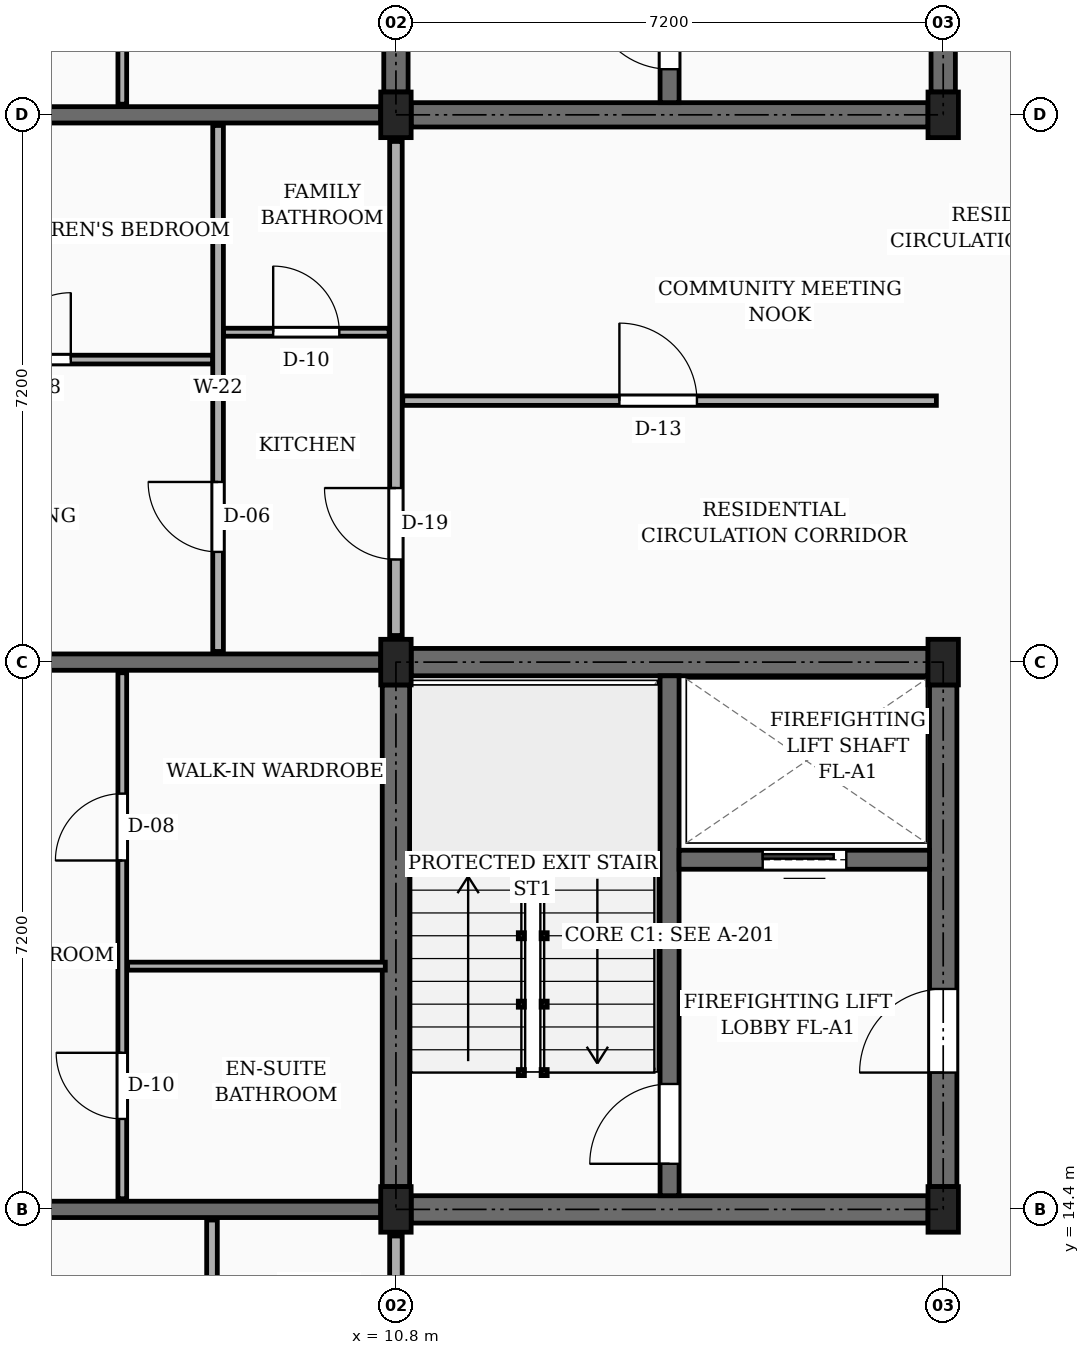
"""IFC4 building model, lengths in metres.
Left out: names, types, materials, properties, quantities, classifications, styles, units other than length and angle.
Written with IfcOpenShell. Run it as: python <this file> out.ifc"""

import sys

from ifc_helpers import new_model, si_unit, direction, frame, frame_2d, origin, origin_2d, place, context, subcontext, project, spatial, rectangle, extrude, element, fill, save


model = new_model("IFC4")
c1 = context("Model", 3, precision=1e-05, world=origin(), true_north=direction((0.0, 1.0)))
c2 = subcontext(c1, "Body", "Model", "MODEL_VIEW")
j1 = project(units=[si_unit("LENGTHUNIT", "METRE"), si_unit("PLANEANGLEUNIT", "RADIAN")], contexts=[c1])
p1 = place(None, origin())
s1 = spatial("IfcSite", under=j1, at=p1, CompositionType="ELEMENT")
p2 = place(p1, origin())
s2 = spatial("IfcBuilding", under=s1, at=p2, CompositionType="ELEMENT")
p3 = place(p2, frame((0.0, 0.0, 26.55)))
s3 = spatial("IfcBuildingStorey", under=s2, at=p3, CompositionType="ELEMENT", Elevation=26.55)
for number, where, z_axis, x_axis in (
    (1, (10.8, 14.4, 0.0), (0.0, 0.0, 1.0), (1.0, 0.0, 0.0)),
    (2, (10.8, 21.6, 0.0), (0.0, 0.0, 1.0), (1.0, 0.0, 0.0)),
    (3, (10.8, 28.8, 0.0), (0.0, 0.0, 1.0), (1.0, 0.0, 0.0)),
    (4, (18.0, 14.4, 0.0), (0.0, 0.0, 1.0), (1.0, 0.0, 0.0)),
    (5, (18.0, 21.6, 0.0), (0.0, 0.0, 1.0), (1.0, 0.0, 0.0)),
    (6, (18.0, 28.8, 0.0), (0.0, 0.0, 1.0), (1.0, 0.0, 0.0)),
):
    element("IfcColumn", number, at=place(p3, frame(where, z_axis=z_axis, x_axis=x_axis)), inside=s3, PredefinedType="COLUMN", context=c2, shape_type="SweptSolid", body=[
        extrude(rectangle(XDim=0.4, YDim=0.6, at=origin_2d()), origin(), (0.0, 0.0, 1.0), 3.15),
    ])
p4 = place(p3, frame((3.85, 14.4, 0.0), z_axis=(0.0, 0.0, 1.0), x_axis=(1.0, 0.0, 0.0)))
e7 = element("IfcWall", 7, at=p4, inside=s3, PredefinedType="SOLIDWALL", context=c2, shape_type="SweptSolid", body=[
    extrude(rectangle(XDim=6.75, YDim=0.215, at=frame_2d((3.375, 0.0))), origin(), (0.0, 0.0, 1.0), 2.17),
])
p5 = place(p4, frame((1.35, 0.0, 0.0)))
e8 = element("IfcOpeningElement", 8, at=p5, cuts=e7, PredefinedType="OPENING", context=c2, shape_type="SweptSolid", body=[
    extrude(rectangle(XDim=0.98, YDim=2.12, at=frame_2d((0.49, 1.06))), frame((0.0, 0.118, 0.0), z_axis=(0.0, -1.0, 0.0), x_axis=(1.0, 0.0, 0.0)), (0.0, 0.0, 1.0), 0.235),
])
p6 = place(p3, frame((3.85, 21.6, 0.0), z_axis=(0.0, 0.0, 1.0), x_axis=(1.0, 0.0, 0.0)))
e9 = element("IfcWall", 9, at=p6, inside=s3, PredefinedType="SOLIDWALL", context=c2, shape_type="SweptSolid", body=[
    extrude(rectangle(XDim=6.75, YDim=0.215, at=frame_2d((3.375, 0.0))), origin(), (0.0, 0.0, 1.0), 2.17),
])
p7 = place(p3, frame((3.85, 28.8, 0.0), z_axis=(0.0, 0.0, 1.0), x_axis=(1.0, 0.0, 0.0)))
e10 = element("IfcWall", 10, at=p7, inside=s3, PredefinedType="SOLIDWALL", context=c2, shape_type="SweptSolid", body=[
    extrude(rectangle(XDim=6.75, YDim=0.215, at=frame_2d((3.375, 0.0))), origin(), (0.0, 0.0, 1.0), 2.17),
])
p8 = place(p7, frame((1.35, 0.0, 0.0)))
e11 = element("IfcOpeningElement", 11, at=p8, cuts=e10, PredefinedType="OPENING", context=c2, shape_type="SweptSolid", body=[
    extrude(rectangle(XDim=0.98, YDim=2.12, at=frame_2d((0.49, 1.06))), frame((0.0, 0.118, 0.0), z_axis=(0.0, -1.0, 0.0), x_axis=(1.0, 0.0, 0.0)), (0.0, 0.0, 1.0), 0.235),
])
p9 = place(p3, frame((10.8, 14.7, 0.0), z_axis=(0.0, 0.0, 1.0), x_axis=(0.0, 1.0, 0.0)))
e12 = element("IfcWall", 12, at=p9, inside=s3, PredefinedType="SHEAR", context=c2, shape_type="SweptSolid", body=[
    extrude(rectangle(XDim=6.6, YDim=0.36, at=frame_2d((3.3, 0.0))), origin(), (0.0, 0.0, 1.0), 2.87),
])
p10 = place(p3, frame((11.0, 21.6, 0.0), z_axis=(0.0, 0.0, 1.0), x_axis=(1.0, 0.0, 0.0)))
e13 = element("IfcWall", 13, at=p10, inside=s3, PredefinedType="SHEAR", context=c2, shape_type="SweptSolid", body=[
    extrude(rectangle(XDim=6.8, YDim=0.36, at=frame_2d((3.4, 0.0))), origin(), (0.0, 0.0, 1.0), 2.87),
])
p11 = place(p3, frame((18.0, 14.7, 0.0), z_axis=(0.0, 0.0, 1.0), x_axis=(0.0, 1.0, 0.0)))
e14 = element("IfcWall", 14, at=p11, inside=s3, PredefinedType="SHEAR", context=c2, shape_type="SweptSolid", body=[
    extrude(rectangle(XDim=6.6, YDim=0.36, at=frame_2d((3.3, 0.0))), origin(), (0.0, 0.0, 1.0), 2.87),
])
p12 = place(p11, frame((1.5, 0.0, 0.0)))
e15 = element("IfcOpeningElement", 15, at=p12, cuts=e14, PredefinedType="OPENING", context=c2, shape_type="SweptSolid", body=[
    extrude(rectangle(XDim=1.1, YDim=2.15, at=frame_2d((0.55, 1.075))), frame((0.0, 0.19, 0.0), z_axis=(0.0, -1.0, 0.0), x_axis=(1.0, 0.0, 0.0)), (0.0, 0.0, 1.0), 0.38),
])
p13 = place(p3, frame((11.0, 14.4, 0.0), z_axis=(0.0, 0.0, 1.0), x_axis=(1.0, 0.0, 0.0)))
e16 = element("IfcWall", 16, at=p13, inside=s3, PredefinedType="SHEAR", context=c2, shape_type="SweptSolid", body=[
    extrude(rectangle(XDim=6.8, YDim=0.36, at=frame_2d((3.4, 0.0))), origin(), (0.0, 0.0, 1.0), 2.87),
])
p14 = place(p3, frame((14.4, 14.58, 0.0), z_axis=(0.0, 0.0, 1.0), x_axis=(0.0, 1.0, 0.0)))
e17 = element("IfcWall", 17, at=p14, inside=s3, PredefinedType="SHEAR", context=c2, shape_type="SweptSolid", body=[
    extrude(rectangle(XDim=6.84, YDim=0.25, at=frame_2d((3.42, 0.0))), origin(), (0.0, 0.0, 1.0), 2.87),
])
p15 = place(p14, frame((0.42, 0.0, 0.0)))
e18 = element("IfcOpeningElement", 18, at=p15, cuts=e17, PredefinedType="OPENING", context=c2, shape_type="SweptSolid", body=[
    extrude(rectangle(XDim=1.05, YDim=2.15, at=frame_2d((0.525, 1.075))), frame((0.0, 0.135, 0.0), z_axis=(0.0, -1.0, 0.0), x_axis=(1.0, 0.0, 0.0)), (0.0, 0.0, 1.0), 0.27),
])
p16 = place(p3, frame((14.525, 19.0, 0.0), z_axis=(0.0, 0.0, 1.0), x_axis=(1.0, 0.0, 0.0)))
e19 = element("IfcWall", 19, at=p16, inside=s3, PredefinedType="SHEAR", context=c2, shape_type="SweptSolid", body=[
    extrude(rectangle(XDim=3.295, YDim=0.25, at=frame_2d((1.647, 0.0))), origin(), (0.0, 0.0, 1.0), 2.87),
])
p17 = place(p16, frame((1.1, 0.0, 0.0)))
e20 = element("IfcOpeningElement", 20, at=p17, cuts=e19, PredefinedType="OPENING", context=c2, shape_type="SweptSolid", body=[
    extrude(rectangle(XDim=1.1, YDim=2.2, at=frame_2d((0.55, 1.1))), frame((0.0, 0.135, 0.0), z_axis=(0.0, -1.0, 0.0), x_axis=(1.0, 0.0, 0.0)), (0.0, 0.0, 1.0), 0.27),
])
p18 = place(p3, frame((10.8, 29.1, 0.0), z_axis=(0.0, 0.0, 1.0), x_axis=(0.0, 1.0, 0.0)))
e21 = element("IfcWall", 21, at=p18, inside=s3, PredefinedType="SHEAR", context=c2, shape_type="SweptSolid", body=[
    extrude(rectangle(XDim=6.6, YDim=0.32, at=frame_2d((3.3, 0.0))), origin(), (0.0, 0.0, 1.0), 2.87),
])
p19 = place(p3, frame((18.0, 29.1, 0.0), z_axis=(0.0, 0.0, 1.0), x_axis=(0.0, 1.0, 0.0)))
e22 = element("IfcWall", 22, at=p19, inside=s3, PredefinedType="SHEAR", context=c2, shape_type="SweptSolid", body=[
    extrude(rectangle(XDim=6.6, YDim=0.32, at=frame_2d((3.3, 0.0))), origin(), (0.0, 0.0, 1.0), 2.87),
])
p20 = place(p19, frame((1.5, 0.0, 0.0)))
e23 = element("IfcOpeningElement", 23, at=p20, cuts=e22, PredefinedType="OPENING", context=c2, shape_type="SweptSolid", body=[
    extrude(rectangle(XDim=1.1, YDim=2.15, at=frame_2d((0.55, 1.075))), frame((0.0, 0.17, 0.0), z_axis=(0.0, -1.0, 0.0), x_axis=(1.0, 0.0, 0.0)), (0.0, 0.0, 1.0), 0.34),
])
p21 = place(p3, frame((11.0, 28.8, 0.0), z_axis=(0.0, 0.0, 1.0), x_axis=(1.0, 0.0, 0.0)))
e24 = element("IfcWall", 24, at=p21, inside=s3, PredefinedType="SHEAR", context=c2, shape_type="SweptSolid", body=[
    extrude(rectangle(XDim=6.8, YDim=0.32, at=frame_2d((3.4, 0.0))), origin(), (0.0, 0.0, 1.0), 2.87),
])
p22 = place(p3, frame((14.4, 28.96, 0.0), z_axis=(0.0, 0.0, 1.0), x_axis=(0.0, 1.0, 0.0)))
e25 = element("IfcWall", 25, at=p22, inside=s3, PredefinedType="SHEAR", context=c2, shape_type="SweptSolid", body=[
    extrude(rectangle(XDim=6.88, YDim=0.25, at=frame_2d((3.44, 0.0))), origin(), (0.0, 0.0, 1.0), 2.87),
])
p23 = place(p22, frame((0.44, 0.0, 0.0)))
e26 = element("IfcOpeningElement", 26, at=p23, cuts=e25, PredefinedType="OPENING", context=c2, shape_type="SweptSolid", body=[
    extrude(rectangle(XDim=1.05, YDim=2.15, at=frame_2d((0.525, 1.075))), frame((0.0, 0.135, 0.0), z_axis=(0.0, -1.0, 0.0), x_axis=(1.0, 0.0, 0.0)), (0.0, 0.0, 1.0), 0.27),
])
p24 = place(p3, frame((10.8, 7.55, 0.0), z_axis=(0.0, 0.0, 1.0), x_axis=(0.0, 1.0, 0.0)))
e27 = element("IfcWall", 27, at=p24, inside=s3, PredefinedType="PARTITIONING", context=c2, shape_type="SweptSolid", body=[
    extrude(rectangle(XDim=6.5, YDim=0.165, at=frame_2d((3.25, 0.0))), origin(), (0.0, 0.0, 1.0), 2.305),
])
p25 = place(p24, frame((1.0, 0.0, 0.0)))
e28 = element("IfcOpeningElement", 28, at=p25, cuts=e27, PredefinedType="OPENING", context=c2, shape_type="SweptSolid", body=[
    extrude(rectangle(XDim=1.0, YDim=2.15, at=frame_2d((0.5, 1.075))), frame((0.0, 0.093, 0.0), z_axis=(0.0, -1.0, 0.0), x_axis=(1.0, 0.0, 0.0)), (0.0, 0.0, 1.0), 0.185),
])
p26 = place(p3, frame((10.8, 21.95, 0.0), z_axis=(0.0, 0.0, 1.0), x_axis=(0.0, 1.0, 0.0)))
e29 = element("IfcWall", 29, at=p26, inside=s3, PredefinedType="PARTITIONING", context=c2, shape_type="SweptSolid", body=[
    extrude(rectangle(XDim=6.5, YDim=0.165, at=frame_2d((3.25, 0.0))), origin(), (0.0, 0.0, 1.0), 2.305),
])
p27 = place(p26, frame((1.0, 0.0, 0.0)))
e30 = element("IfcOpeningElement", 30, at=p27, cuts=e29, PredefinedType="OPENING", context=c2, shape_type="SweptSolid", body=[
    extrude(rectangle(XDim=0.94, YDim=2.12, at=frame_2d((0.47, 1.06))), frame((0.0, 0.093, 0.0), z_axis=(0.0, -1.0, 0.0), x_axis=(1.0, 0.0, 0.0)), (0.0, 0.0, 1.0), 0.185),
])
p28 = place(p3, frame((8.38, 7.375, 0.0), z_axis=(0.0, 0.0, 1.0), x_axis=(0.0, 1.0, 0.0)))
e31 = element("IfcWall", 31, at=p28, inside=s3, PredefinedType="PARTITIONING", context=c2, shape_type="SweptSolid", body=[
    extrude(rectangle(XDim=6.885, YDim=0.14, at=frame_2d((3.442, 0.0))), origin(), (0.0, 0.0, 1.0), 2.305),
])
p29 = place(p28, frame((1.275, 0.0, 0.0)))
e32 = element("IfcOpeningElement", 32, at=p29, cuts=e31, PredefinedType="OPENING", context=c2, shape_type="SweptSolid", body=[
    extrude(rectangle(XDim=0.92, YDim=2.1, at=frame_2d((0.46, 1.05))), frame((0.0, 0.08, 0.0), z_axis=(0.0, -1.0, 0.0), x_axis=(1.0, 0.0, 0.0)), (0.0, 0.0, 1.0), 0.16),
])
p30 = place(p3, frame((7.2, 14.54, 0.0), z_axis=(0.0, 0.0, 1.0), x_axis=(0.0, 1.0, 0.0)))
e33 = element("IfcWall", 33, at=p30, inside=s3, PredefinedType="PARTITIONING", context=c2, shape_type="SweptSolid", body=[
    extrude(rectangle(XDim=6.92, YDim=0.115, at=frame_2d((3.46, 0.0))), origin(), (0.0, 0.0, 1.0), 2.305),
])
p31 = place(p30, frame((1.05, 0.0, 0.0)))
e34 = element("IfcOpeningElement", 34, at=p31, cuts=e33, PredefinedType="OPENING", context=c2, shape_type="SweptSolid", body=[
    extrude(rectangle(XDim=0.87, YDim=2.05, at=frame_2d((0.435, 1.025))), frame((0.0, 0.067, 0.0), z_axis=(0.0, -1.0, 0.0), x_axis=(1.0, 0.0, 0.0)), (0.0, 0.0, 1.0), 0.135),
])
p32 = place(p30, frame((4.45, 0.0, 0.0)))
e35 = element("IfcOpeningElement", 35, at=p32, cuts=e33, PredefinedType="OPENING", context=c2, shape_type="SweptSolid", body=[
    extrude(rectangle(XDim=0.88, YDim=2.08, at=frame_2d((0.44, 1.04))), frame((0.0, 0.067, 0.0), z_axis=(0.0, -1.0, 0.0), x_axis=(1.0, 0.0, 0.0)), (0.0, 0.0, 1.0), 0.135),
])
p33 = place(p3, frame((7.27, 17.6, 0.0), z_axis=(0.0, 0.0, 1.0), x_axis=(1.0, 0.0, 0.0)))
e36 = element("IfcWall", 36, at=p33, inside=s3, PredefinedType="PARTITIONING", context=c2, shape_type="SweptSolid", body=[
    extrude(rectangle(XDim=3.39, YDim=0.105, at=frame_2d((1.695, 0.0))), origin(), (0.0, 0.0, 1.0), 2.305),
])
p34 = place(p3, frame((10.89, 25.04, 0.0), z_axis=(0.0, 0.0, 1.0), x_axis=(1.0, 0.0, 0.0)))
e37 = element("IfcWall", 37, at=p34, inside=s3, PredefinedType="PARTITIONING", context=c2, shape_type="SweptSolid", body=[
    extrude(rectangle(XDim=7.02, YDim=0.125, at=frame_2d((3.51, 0.0))), origin(), (0.0, 0.0, 1.0), 2.305),
])
p35 = place(p34, frame((2.85, 0.0, 0.0)))
e38 = element("IfcOpeningElement", 38, at=p35, cuts=e37, PredefinedType="OPENING", context=c2, shape_type="SweptSolid", body=[
    extrude(rectangle(XDim=1.02, YDim=2.15, at=frame_2d((0.51, 1.075))), frame((0.0, 0.073, 0.0), z_axis=(0.0, -1.0, 0.0), x_axis=(1.0, 0.0, 0.0)), (0.0, 0.0, 1.0), 0.145),
])
p36 = place(p3, frame((3.775, 25.58, 0.0), z_axis=(0.0, 0.0, 1.0), x_axis=(1.0, 0.0, 0.0)))
e39 = element("IfcWall", 39, at=p36, inside=s3, PredefinedType="PARTITIONING", context=c2, shape_type="SweptSolid", body=[
    extrude(rectangle(XDim=4.615, YDim=0.115, at=frame_2d((2.308, 0.0))), origin(), (0.0, 0.0, 1.0), 2.305),
])
p37 = place(p36, frame((1.867, 0.0, 0.0)))
e40 = element("IfcOpeningElement", 40, at=p37, cuts=e39, PredefinedType="OPENING", context=c2, shape_type="SweptSolid", body=[
    extrude(rectangle(XDim=0.88, YDim=2.08, at=frame_2d((0.44, 1.04))), frame((0.0, 0.067, 0.0), z_axis=(0.0, -1.0, 0.0), x_axis=(1.0, 0.0, 0.0)), (0.0, 0.0, 1.0), 0.135),
])
p38 = place(p3, frame((8.53, 25.94, 0.0), z_axis=(0.0, 0.0, 1.0), x_axis=(1.0, 0.0, 0.0)))
e41 = element("IfcWall", 41, at=p38, inside=s3, PredefinedType="PARTITIONING", context=c2, shape_type="SweptSolid", body=[
    extrude(rectangle(XDim=2.18, YDim=0.105, at=frame_2d((1.09, 0.0))), origin(), (0.0, 0.0, 1.0), 2.305),
])
p39 = place(p38, frame((0.655, 0.0, 0.0)))
e42 = element("IfcOpeningElement", 42, at=p39, cuts=e41, PredefinedType="OPENING", context=c2, shape_type="SweptSolid", body=[
    extrude(rectangle(XDim=0.87, YDim=2.05, at=frame_2d((0.435, 1.025))), frame((0.0, 0.062, 0.0), z_axis=(0.0, -1.0, 0.0), x_axis=(1.0, 0.0, 0.0)), (0.0, 0.0, 1.0), 0.125),
])
p40 = place(p3, frame((8.46, 21.74, 0.0), z_axis=(0.0, 0.0, 1.0), x_axis=(0.0, 1.0, 0.0)))
e43 = element("IfcWall", 43, at=p40, inside=s3, PredefinedType="PARTITIONING", context=c2, shape_type="SweptSolid", body=[
    extrude(rectangle(XDim=6.92, YDim=0.14, at=frame_2d((3.46, 0.0))), origin(), (0.0, 0.0, 1.0), 2.305),
])
p41 = place(p40, frame((1.31, 0.0, 0.0)))
e44 = element("IfcOpeningElement", 44, at=p41, cuts=e43, PredefinedType="OPENING", context=c2, shape_type="SweptSolid", body=[
    extrude(rectangle(XDim=0.92, YDim=2.1, at=frame_2d((0.46, 1.05))), frame((0.0, 0.08, 0.0), z_axis=(0.0, -1.0, 0.0), x_axis=(1.0, 0.0, 0.0)), (0.0, 0.0, 1.0), 0.16),
])
p42 = place(p3, frame((7.2, 28.94, 0.0), z_axis=(0.0, 0.0, 1.0), x_axis=(0.0, 1.0, 0.0)))
e45 = element("IfcWall", 45, at=p42, inside=s3, PredefinedType="PARTITIONING", context=c2, shape_type="SweptSolid", body=[
    extrude(rectangle(XDim=6.92, YDim=0.115, at=frame_2d((3.46, 0.0))), origin(), (0.0, 0.0, 1.0), 2.305),
])
p43 = place(p42, frame((1.05, 0.0, 0.0)))
e46 = element("IfcOpeningElement", 46, at=p43, cuts=e45, PredefinedType="OPENING", context=c2, shape_type="SweptSolid", body=[
    extrude(rectangle(XDim=0.87, YDim=2.05, at=frame_2d((0.435, 1.025))), frame((0.0, 0.067, 0.0), z_axis=(0.0, -1.0, 0.0), x_axis=(1.0, 0.0, 0.0)), (0.0, 0.0, 1.0), 0.135),
])
p44 = place(p42, frame((4.45, 0.0, 0.0)))
e47 = element("IfcOpeningElement", 47, at=p44, cuts=e45, PredefinedType="OPENING", context=c2, shape_type="SweptSolid", body=[
    extrude(rectangle(XDim=0.88, YDim=2.08, at=frame_2d((0.44, 1.04))), frame((0.0, 0.067, 0.0), z_axis=(0.0, -1.0, 0.0), x_axis=(1.0, 0.0, 0.0)), (0.0, 0.0, 1.0), 0.135),
])
p45 = place(p12, frame((1.1, 0.0, 0.0), z_axis=(0.0, 0.0, 1.0), x_axis=(-1.0, 0.0, 0.0)))
e48 = element("IfcDoor", 48, at=p45, inside=s3, OperationType="SINGLE_SWING_LEFT", PredefinedType="DOOR", context=c2, shape_type="SweptSolid", body=[
    extrude(rectangle(XDim=1.1, YDim=2.15, at=frame_2d((0.55, 1.075))), frame((0.0, 0.025, 0.0), z_axis=(0.0, -1.0, 0.0), x_axis=(1.0, 0.0, 0.0)), (0.0, 0.0, 1.0), 0.05),
])
fill(e15, e48)
p46 = place(p15, origin())
e49 = element("IfcDoor", 49, at=p46, inside=s3, OperationType="SINGLE_SWING_LEFT", PredefinedType="DOOR", context=c2, shape_type="SweptSolid", body=[
    extrude(rectangle(XDim=1.05, YDim=2.15, at=frame_2d((0.525, 1.075))), frame((0.0, 0.025, 0.0), z_axis=(0.0, -1.0, 0.0), x_axis=(1.0, 0.0, 0.0)), (0.0, 0.0, 1.0), 0.05),
])
fill(e18, e49)
p47 = place(p17, origin())
e50 = element("IfcDoor", 50, at=p47, inside=s3, OperationType="SLIDING_TO_LEFT", PredefinedType="DOOR", context=c2, shape_type="SweptSolid", body=[
    extrude(rectangle(XDim=1.1, YDim=2.2, at=frame_2d((0.55, 1.1))), frame((0.0, 0.025, 0.0), z_axis=(0.0, -1.0, 0.0), x_axis=(1.0, 0.0, 0.0)), (0.0, 0.0, 1.0), 0.05),
])
fill(e20, e50)
p48 = place(p23, origin())
e51 = element("IfcDoor", 51, at=p48, inside=s3, OperationType="SINGLE_SWING_RIGHT", PredefinedType="DOOR", context=c2, shape_type="SweptSolid", body=[
    extrude(rectangle(XDim=1.05, YDim=2.15, at=frame_2d((0.525, 1.075))), frame((0.0, 0.025, 0.0), z_axis=(0.0, -1.0, 0.0), x_axis=(1.0, 0.0, 0.0)), (0.0, 0.0, 1.0), 0.05),
])
fill(e26, e51)
p49 = place(p27, origin())
e52 = element("IfcDoor", 52, at=p49, inside=s3, OperationType="SINGLE_SWING_RIGHT", PredefinedType="DOOR", context=c2, shape_type="SweptSolid", body=[
    extrude(rectangle(XDim=0.94, YDim=2.12, at=frame_2d((0.47, 1.06))), frame((0.0, 0.025, 0.0), z_axis=(0.0, -1.0, 0.0), x_axis=(1.0, 0.0, 0.0)), (0.0, 0.0, 1.0), 0.05),
])
fill(e30, e52)
p50 = place(p31, origin())
e53 = element("IfcDoor", 53, at=p50, inside=s3, OperationType="SINGLE_SWING_RIGHT", PredefinedType="DOOR", context=c2, shape_type="SweptSolid", body=[
    extrude(rectangle(XDim=0.87, YDim=2.05, at=frame_2d((0.435, 1.025))), frame((0.0, 0.025, 0.0), z_axis=(0.0, -1.0, 0.0), x_axis=(1.0, 0.0, 0.0)), (0.0, 0.0, 1.0), 0.05),
])
fill(e34, e53)
p51 = place(p32, origin())
e54 = element("IfcDoor", 54, at=p51, inside=s3, OperationType="SINGLE_SWING_LEFT", PredefinedType="DOOR", context=c2, shape_type="SweptSolid", body=[
    extrude(rectangle(XDim=0.88, YDim=2.08, at=frame_2d((0.44, 1.04))), frame((0.0, 0.025, 0.0), z_axis=(0.0, -1.0, 0.0), x_axis=(1.0, 0.0, 0.0)), (0.0, 0.0, 1.0), 0.05),
])
fill(e35, e54)
p52 = place(p35, origin())
e55 = element("IfcDoor", 55, at=p52, inside=s3, OperationType="SINGLE_SWING_LEFT", PredefinedType="DOOR", context=c2, shape_type="SweptSolid", body=[
    extrude(rectangle(XDim=1.02, YDim=2.15, at=frame_2d((0.51, 1.075))), frame((0.0, 0.025, 0.0), z_axis=(0.0, -1.0, 0.0), x_axis=(1.0, 0.0, 0.0)), (0.0, 0.0, 1.0), 0.05),
])
fill(e38, e55)
p53 = place(p37, origin())
e56 = element("IfcDoor", 56, at=p53, inside=s3, OperationType="SINGLE_SWING_RIGHT", PredefinedType="DOOR", context=c2, shape_type="SweptSolid", body=[
    extrude(rectangle(XDim=0.88, YDim=2.08, at=frame_2d((0.44, 1.04))), frame((0.0, 0.025, 0.0), z_axis=(0.0, -1.0, 0.0), x_axis=(1.0, 0.0, 0.0)), (0.0, 0.0, 1.0), 0.05),
])
fill(e40, e56)
p54 = place(p39, origin())
e57 = element("IfcDoor", 57, at=p54, inside=s3, OperationType="SINGLE_SWING_LEFT", PredefinedType="DOOR", context=c2, shape_type="SweptSolid", body=[
    extrude(rectangle(XDim=0.87, YDim=2.05, at=frame_2d((0.435, 1.025))), frame((0.0, 0.025, 0.0), z_axis=(0.0, -1.0, 0.0), x_axis=(1.0, 0.0, 0.0)), (0.0, 0.0, 1.0), 0.05),
])
fill(e42, e57)
p55 = place(p41, origin())
e58 = element("IfcDoor", 58, at=p55, inside=s3, OperationType="SINGLE_SWING_RIGHT", PredefinedType="DOOR", context=c2, shape_type="SweptSolid", body=[
    extrude(rectangle(XDim=0.92, YDim=2.1, at=frame_2d((0.46, 1.05))), frame((0.0, 0.025, 0.0), z_axis=(0.0, -1.0, 0.0), x_axis=(1.0, 0.0, 0.0)), (0.0, 0.0, 1.0), 0.05),
])
fill(e44, e58)
save(model, sys.argv[1])
